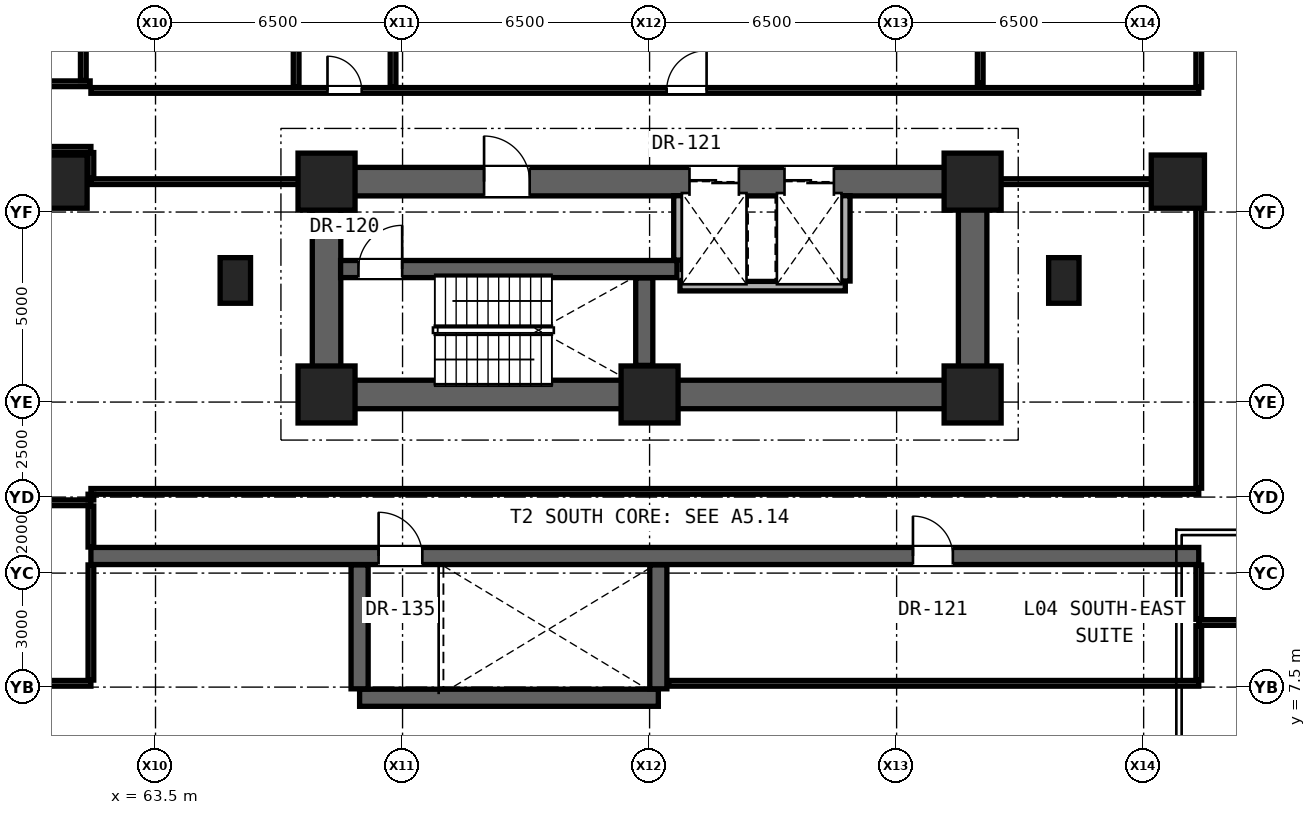
"""IFC4 building model, lengths in metres.
Left out: names, types, materials, properties, quantities, classifications, styles, units other than length and angle.
Written with IfcOpenShell. Run it as: python <this file> out.ifc"""

import sys

from ifc_helpers import new_model, si_unit, direction, frame, frame_2d, origin, origin_2d, place, context, subcontext, project, spatial, rectangle, hollow_rectangle, extrude, element, fill, save


model = new_model("IFC4")
c1 = context("Model", 3, precision=1e-05, world=origin(), true_north=direction((0.0, 1.0)))
c2 = subcontext(c1, "Body", "Model", "MODEL_VIEW")
j1 = project(units=[si_unit("LENGTHUNIT", "METRE"), si_unit("PLANEANGLEUNIT", "RADIAN")], contexts=[c1])
p1 = place(None, origin())
s1 = spatial("IfcSite", under=j1, at=p1, CompositionType="ELEMENT")
p2 = place(p1, origin())
s2 = spatial("IfcBuilding", under=s1, at=p2, CompositionType="ELEMENT")
p3 = place(p2, frame((0.0, 0.0, 18.1)))
s3 = spatial("IfcBuildingStorey", under=s2, at=p3, CompositionType="ELEMENT", Elevation=18.1)
for number, where, z_axis, x_axis in (
    (1, (68.0, 15.2, 0.0), (0.0, 0.0, 1.0), (1.0, 0.0, 0.0)),
    (2, (76.5, 15.2, 0.0), (0.0, 0.0, 1.0), (1.0, 0.0, 0.0)),
    (3, (85.0, 15.2, 0.0), (0.0, 0.0, 1.0), (1.0, 0.0, 0.0)),
    (4, (68.0, 20.8, 0.0), (0.0, 0.0, 1.0), (1.0, 0.0, 0.0)),
    (5, (85.0, 20.8, 0.0), (0.0, 0.0, 1.0), (1.0, 0.0, 0.0)),
):
    element("IfcColumn", number, at=place(p3, frame(where, z_axis=z_axis, x_axis=x_axis)), inside=s3, PredefinedType="COLUMN", context=c2, shape_type="SweptSolid", body=[
        extrude(rectangle(XDim=1.5, YDim=1.5, at=origin_2d()), origin(), (0.0, 0.0, 1.0), 4.3),
    ])
for number, where, z_axis, x_axis in (
    (6, (61.0, 20.8, 0.0), (0.0, 0.0, 1.0), (1.0, 0.0, 0.0)),
    (7, (90.4, 20.8, 0.0), (0.0, 0.0, 1.0), (1.0, 0.0, 0.0)),
):
    element("IfcColumn", number, at=place(p3, frame(where, z_axis=z_axis, x_axis=x_axis)), inside=s3, PredefinedType="COLUMN", context=c2, shape_type="SweptSolid", body=[
        extrude(hollow_rectangle(XDim=1.4, YDim=1.4, WallThickness=0.08, at=origin_2d()), origin(), (0.0, 0.0, 1.0), 4.3),
    ])
for number, where, z_axis, x_axis in (
    (8, (65.6, 18.2, 0.0), (0.0, 0.0, 1.0), (1.0, 0.0, 0.0)),
    (9, (87.4, 18.2, 0.0), (0.0, 0.0, 1.0), (1.0, 0.0, 0.0)),
):
    element("IfcColumn", number, at=place(p3, frame(where, z_axis=z_axis, x_axis=x_axis)), inside=s3, PredefinedType="PILASTER", context=c2, shape_type="SweptSolid", body=[
        extrude(rectangle(XDim=0.8, YDim=1.2, at=origin_2d()), origin(), (0.0, 0.0, 1.0), 4.3),
    ])
p4 = place(p3, frame((68.0, 15.2, 0.0), z_axis=(0.0, 0.0, 1.0), x_axis=(1.0, 0.0, 0.0)))
e10 = element("IfcWall", 10, at=p4, inside=s3, PredefinedType="SHEAR", context=c2, shape_type="SweptSolid", body=[
    extrude(rectangle(XDim=17.0, YDim=0.75, at=frame_2d((8.5, 0.0))), origin(), (0.0, 0.0, 1.0), 3.65),
])
for number, where, z_axis, x_axis in (
    (11, (68.0, 15.2, 0.0), (0.0, 0.0, 1.0), (0.0, 1.0, 0.0)),
    (12, (85.0, 15.2, 0.0), (0.0, 0.0, 1.0), (0.0, 1.0, 0.0)),
):
    element("IfcWall", number, at=place(p3, frame(where, z_axis=z_axis, x_axis=x_axis)), inside=s3, PredefinedType="SHEAR", context=c2, shape_type="SweptSolid", body=[
        extrude(rectangle(XDim=5.6, YDim=0.75, at=frame_2d((2.8, 0.0))), origin(), (0.0, 0.0, 1.0), 3.65),
    ])
p5 = place(p3, frame((68.0, 20.8, 0.0), z_axis=(0.0, 0.0, 1.0), x_axis=(1.0, 0.0, 0.0)))
e13 = element("IfcWall", 13, at=p5, inside=s3, PredefinedType="SHEAR", context=c2, shape_type="SweptSolid", body=[
    extrude(rectangle(XDim=17.0, YDim=0.75, at=frame_2d((8.5, 0.0))), origin(), (0.0, 0.0, 1.0), 3.65),
])
p6 = place(p5, frame((4.145, 0.0, 0.0)))
e14 = element("IfcOpeningElement", 14, at=p6, cuts=e13, PredefinedType="OPENING", context=c2, shape_type="SweptSolid", body=[
    extrude(rectangle(XDim=1.2, YDim=2.25, at=frame_2d((0.6, 1.125))), frame((0.0, 0.385, 0.0), z_axis=(0.0, -1.0, 0.0), x_axis=(1.0, 0.0, 0.0)), (0.0, 0.0, 1.0), 0.77),
])
p7 = place(p5, frame((9.55, 0.0, 0.0)))
e15 = element("IfcOpeningElement", 15, at=p7, cuts=e13, PredefinedType="OPENING", context=c2, shape_type="SweptSolid", body=[
    extrude(rectangle(XDim=1.3, YDim=2.3, at=frame_2d((0.65, 1.15))), frame((0.0, 0.385, 0.0), z_axis=(0.0, -1.0, 0.0), x_axis=(1.0, 0.0, 0.0)), (0.0, 0.0, 1.0), 0.77),
])
p8 = place(p5, frame((12.05, 0.0, 0.0)))
e16 = element("IfcOpeningElement", 16, at=p8, cuts=e13, PredefinedType="OPENING", context=c2, shape_type="SweptSolid", body=[
    extrude(rectangle(XDim=1.3, YDim=2.3, at=frame_2d((0.65, 1.15))), frame((0.0, 0.385, 0.0), z_axis=(0.0, -1.0, 0.0), x_axis=(1.0, 0.0, 0.0)), (0.0, 0.0, 1.0), 0.77),
])
p9 = place(p3, frame((68.87, 7.22, 0.0), z_axis=(0.0, 0.0, 1.0), x_axis=(1.0, 0.0, 0.0)))
e17 = element("IfcWall", 17, at=p9, inside=s3, PredefinedType="SHEAR", context=c2, shape_type="SweptSolid", body=[
    extrude(rectangle(XDim=7.86, YDim=0.45, at=frame_2d((3.93, 0.0))), origin(), (0.0, 0.0, 1.0), 3.65),
])
p10 = place(p3, frame((29.4, 7.6, 0.0), z_axis=(0.0, 0.0, 1.0), x_axis=(1.0, 0.0, 0.0)))
e18 = element("IfcWall", 18, at=p10, inside=s3, PredefinedType="PARTITIONING", context=c2, shape_type="SweptSolid", body=[
    extrude(rectangle(XDim=32.4, YDim=0.15, at=frame_2d((16.2, 0.0))), origin(), (0.0, 0.0, 1.0), 2.869),
])
p11 = place(p3, frame((77.0, 7.6, 0.0), z_axis=(0.0, 0.0, 1.0), x_axis=(1.0, 0.0, 0.0)))
e19 = element("IfcWall", 19, at=p11, inside=s3, PredefinedType="PARTITIONING", context=c2, shape_type="SweptSolid", body=[
    extrude(rectangle(XDim=13.95, YDim=0.15, at=frame_2d((6.975, 0.0))), origin(), (0.0, 0.0, 1.0), 2.786),
])
p12 = place(p3, frame((90.95, 9.2, 0.0), z_axis=(0.0, 0.0, 1.0), x_axis=(1.0, 0.0, 0.0)))
e20 = element("IfcWall", 20, at=p12, inside=s3, PredefinedType="PARTITIONING", context=c2, shape_type="SweptSolid", body=[
    extrude(rectangle(XDim=1.7, YDim=0.15, at=frame_2d((0.85, 0.0))), origin(), (0.0, 0.0, 1.0), 3.65),
])
p13 = place(p3, frame((61.8, 10.95, 0.0), z_axis=(0.0, 0.0, 1.0), x_axis=(1.0, 0.0, 0.0)))
e21 = element("IfcWall", 21, at=p13, inside=s3, PredefinedType="SHEAR", context=c2, shape_type="SweptSolid", body=[
    extrude(rectangle(XDim=29.15, YDim=0.45, at=frame_2d((14.575, 0.0))), origin(), (0.0, 0.0, 1.0), 3.65),
])
p14 = place(p13, frame((7.57, 0.0, 0.0)))
e22 = element("IfcOpeningElement", 22, at=p14, cuts=e21, PredefinedType="OPENING", context=c2, shape_type="SweptSolid", body=[
    extrude(rectangle(XDim=1.15, YDim=2.2, at=frame_2d((0.575, 1.1))), frame((0.0, 0.235, 0.0), z_axis=(0.0, -1.0, 0.0), x_axis=(1.0, 0.0, 0.0)), (0.0, 0.0, 1.0), 0.47),
])
p15 = place(p13, frame((21.63, 0.0, 0.0)))
e23 = element("IfcOpeningElement", 23, at=p15, cuts=e21, PredefinedType="OPENING", context=c2, shape_type="SweptSolid", body=[
    extrude(rectangle(XDim=1.05, YDim=2.2, at=frame_2d((0.525, 1.1))), frame((0.0, 0.235, 0.0), z_axis=(0.0, -1.0, 0.0), x_axis=(1.0, 0.0, 0.0)), (0.0, 0.0, 1.0), 0.47),
])
p16 = place(p3, frame((38.2, 12.35, 0.0), z_axis=(0.0, 0.0, 1.0), x_axis=(1.0, 0.0, 0.0)))
e24 = element("IfcWall", 24, at=p16, inside=s3, PredefinedType="PARTITIONING", context=c2, shape_type="SweptSolid", body=[
    extrude(rectangle(XDim=23.6, YDim=0.15, at=frame_2d((11.8, 0.0))), origin(), (0.0, 0.0, 1.0), 2.602),
])
p17 = place(p3, frame((61.8, 12.65, 0.0), z_axis=(0.0, 0.0, 1.0), x_axis=(1.0, 0.0, 0.0)))
e25 = element("IfcWall", 25, at=p17, inside=s3, PredefinedType="PARTITIONING", context=c2, shape_type="SweptSolid", body=[
    extrude(rectangle(XDim=29.15, YDim=0.15, at=frame_2d((14.575, 0.0))), origin(), (0.0, 0.0, 1.0), 2.786),
])
p18 = place(p3, frame((77.3, 18.05, 0.0), z_axis=(0.0, 0.0, 1.0), x_axis=(1.0, 0.0, 0.0)))
e26 = element("IfcWall", 26, at=p18, inside=s3, PredefinedType="SOLIDWALL", context=c2, shape_type="SweptSolid", body=[
    extrude(rectangle(XDim=4.35, YDim=0.25, at=frame_2d((2.175, 0.0))), origin(), (0.0, 0.0, 1.0), 3.65),
])
p19 = place(p3, frame((68.37, 18.5, 0.0), z_axis=(0.0, 0.0, 1.0), x_axis=(1.0, 0.0, 0.0)))
e27 = element("IfcWall", 27, at=p19, inside=s3, PredefinedType="SHEAR", context=c2, shape_type="SweptSolid", body=[
    extrude(rectangle(XDim=8.85, YDim=0.45, at=frame_2d((4.425, 0.0))), origin(), (0.0, 0.0, 1.0), 3.65),
])
p20 = place(p19, frame((0.47, 0.0, 0.0)))
e28 = element("IfcOpeningElement", 28, at=p20, cuts=e27, PredefinedType="OPENING", context=c2, shape_type="SweptSolid", body=[
    extrude(rectangle(XDim=1.15, YDim=2.2, at=frame_2d((0.575, 1.1))), frame((0.0, 0.235, 0.0), z_axis=(0.0, -1.0, 0.0), x_axis=(1.0, 0.0, 0.0)), (0.0, 0.0, 1.0), 0.47),
])
p21 = place(p3, frame((61.8, 20.8, 0.0), z_axis=(0.0, 0.0, 1.0), x_axis=(1.0, 0.0, 0.0)))
e29 = element("IfcWall", 29, at=p21, inside=s3, PredefinedType="PARTITIONING", context=c2, shape_type="SweptSolid", body=[
    extrude(rectangle(XDim=5.83, YDim=0.15, at=frame_2d((2.915, 0.0))), origin(), (0.0, 0.0, 1.0), 2.542),
])
p22 = place(p3, frame((85.37, 20.8, 0.0), z_axis=(0.0, 0.0, 1.0), x_axis=(1.0, 0.0, 0.0)))
e30 = element("IfcWall", 30, at=p22, inside=s3, PredefinedType="PARTITIONING", context=c2, shape_type="SweptSolid", body=[
    extrude(rectangle(XDim=5.58, YDim=0.15, at=frame_2d((2.79, 0.0))), origin(), (0.0, 0.0, 1.0), 2.542),
])
p23 = place(p3, frame((40.4, 21.65, 0.0), z_axis=(0.0, 0.0, 1.0), x_axis=(1.0, 0.0, 0.0)))
e31 = element("IfcWall", 31, at=p23, inside=s3, PredefinedType="PARTITIONING", context=c2, shape_type="SweptSolid", body=[
    extrude(rectangle(XDim=21.4, YDim=0.15, at=frame_2d((10.7, 0.0))), origin(), (0.0, 0.0, 1.0), 2.602),
])
p24 = place(p3, frame((61.8, 23.2, 0.0), z_axis=(0.0, 0.0, 1.0), x_axis=(1.0, 0.0, 0.0)))
e32 = element("IfcWall", 32, at=p24, inside=s3, PredefinedType="PARTITIONING", context=c2, shape_type="SweptSolid", body=[
    extrude(rectangle(XDim=29.15, YDim=0.15, at=frame_2d((14.575, 0.0))), origin(), (0.0, 0.0, 1.0), 2.715),
])
p25 = place(p24, frame((6.225, 0.0, 0.0)))
e33 = element("IfcOpeningElement", 33, at=p25, cuts=e32, PredefinedType="OPENING", context=c2, shape_type="SweptSolid", body=[
    extrude(rectangle(XDim=0.9, YDim=2.1, at=frame_2d((0.45, 1.05))), frame((0.0, 0.085, 0.0), z_axis=(0.0, -1.0, 0.0), x_axis=(1.0, 0.0, 0.0)), (0.0, 0.0, 1.0), 0.17),
])
p26 = place(p24, frame((15.15, 0.0, 0.0)))
e34 = element("IfcOpeningElement", 34, at=p26, cuts=e32, PredefinedType="OPENING", context=c2, shape_type="SweptSolid", body=[
    extrude(rectangle(XDim=1.05, YDim=2.2, at=frame_2d((0.525, 1.1))), frame((0.0, 0.085, 0.0), z_axis=(0.0, -1.0, 0.0), x_axis=(1.0, 0.0, 0.0)), (0.0, 0.0, 1.0), 0.17),
])
p27 = place(p3, frame((42.65, 23.375, 0.0), z_axis=(0.0, 0.0, 1.0), x_axis=(1.0, 0.0, 0.0)))
e35 = element("IfcWall", 35, at=p27, inside=s3, PredefinedType="PARTITIONING", context=c2, shape_type="SweptSolid", body=[
    extrude(rectangle(XDim=19.13, YDim=0.15, at=frame_2d((9.565, 0.0))), origin(), (0.0, 0.0, 1.0), 2.602),
])
p28 = place(p3, frame((61.6, 23.46, 0.0), z_axis=(0.0, 0.0, 1.0), x_axis=(0.0, 1.0, 0.0)))
e36 = element("IfcWall", 36, at=p28, inside=s3, PredefinedType="PARTITIONING", context=c2, shape_type="SweptSolid", body=[
    extrude(rectangle(XDim=7.855, YDim=0.15, at=frame_2d((3.927, 0.0))), origin(), (0.0, 0.0, 1.0), 2.869),
])
p29 = place(p3, frame((61.8, 7.685, 0.0), z_axis=(0.0, 0.0, 1.0), x_axis=(0.0, 1.0, 0.0)))
e37 = element("IfcWall", 37, at=p29, inside=s3, PredefinedType="PARTITIONING", context=c2, shape_type="SweptSolid", body=[
    extrude(rectangle(XDim=3.03, YDim=0.15, at=frame_2d((1.515, 0.0))), origin(), (0.0, 0.0, 1.0), 3.65),
])
p30 = place(p3, frame((61.8, 11.185, 0.0), z_axis=(0.0, 0.0, 1.0), x_axis=(0.0, 1.0, 0.0)))
e38 = element("IfcWall", 38, at=p30, inside=s3, PredefinedType="PARTITIONING", context=c2, shape_type="SweptSolid", body=[
    extrude(rectangle(XDim=1.08, YDim=0.15, at=frame_2d((0.54, 0.0))), origin(), (0.0, 0.0, 1.0), 3.65),
])
p31 = place(p3, frame((61.8, 12.425, 0.0), z_axis=(0.0, 0.0, 1.0), x_axis=(0.0, 1.0, 0.0)))
e39 = element("IfcWall", 39, at=p31, inside=s3, PredefinedType="PARTITIONING", context=c2, shape_type="SweptSolid", body=[
    extrude(rectangle(XDim=0.15, YDim=0.15, at=frame_2d((0.075, 0.0))), origin(), (0.0, 0.0, 1.0), 3.65),
])
p32 = place(p3, frame((61.8, 20.885, 0.0), z_axis=(0.0, 0.0, 1.0), x_axis=(0.0, 1.0, 0.0)))
e40 = element("IfcWall", 40, at=p32, inside=s3, PredefinedType="PARTITIONING", context=c2, shape_type="SweptSolid", body=[
    extrude(rectangle(XDim=0.68, YDim=0.15, at=frame_2d((0.34, 0.0))), origin(), (0.0, 0.0, 1.0), 2.542),
])
p33 = place(p3, frame((67.2, 23.285, 0.0), z_axis=(0.0, 0.0, 1.0), x_axis=(0.0, 1.0, 0.0)))
e41 = element("IfcWall", 41, at=p33, inside=s3, PredefinedType="PARTITIONING", context=c2, shape_type="SweptSolid", body=[
    extrude(rectangle(XDim=2.43, YDim=0.15, at=frame_2d((1.215, 0.0))), origin(), (0.0, 0.0, 1.0), 3.65),
])
p34 = place(p3, frame((68.87, 7.455, 0.0), z_axis=(0.0, 0.0, 1.0), x_axis=(0.0, 1.0, 0.0)))
e42 = element("IfcWall", 42, at=p34, inside=s3, PredefinedType="SHEAR", context=c2, shape_type="SweptSolid", body=[
    extrude(rectangle(XDim=3.26, YDim=0.45, at=frame_2d((1.63, 0.0))), origin(), (0.0, 0.0, 1.0), 3.65),
])
p35 = place(p3, frame((69.75, 23.285, 0.0), z_axis=(0.0, 0.0, 1.0), x_axis=(0.0, 1.0, 0.0)))
e43 = element("IfcWall", 43, at=p35, inside=s3, PredefinedType="PARTITIONING", context=c2, shape_type="SweptSolid", body=[
    extrude(rectangle(XDim=2.43, YDim=0.15, at=frame_2d((1.215, 0.0))), origin(), (0.0, 0.0, 1.0), 3.65),
])
p36 = place(p3, frame((76.36, 15.965, 0.0), z_axis=(0.0, 0.0, 1.0), x_axis=(0.0, 1.0, 0.0)))
e44 = element("IfcWall", 44, at=p36, inside=s3, PredefinedType="SHEAR", context=c2, shape_type="SweptSolid", body=[
    extrude(rectangle(XDim=2.3, YDim=0.45, at=frame_2d((1.15, 0.0))), origin(), (0.0, 0.0, 1.0), 3.65),
])
p37 = place(p3, frame((76.73, 7.455, 0.0), z_axis=(0.0, 0.0, 1.0), x_axis=(0.0, 1.0, 0.0)))
e45 = element("IfcWall", 45, at=p37, inside=s3, PredefinedType="SHEAR", context=c2, shape_type="SweptSolid", body=[
    extrude(rectangle(XDim=3.26, YDim=0.45, at=frame_2d((1.63, 0.0))), origin(), (0.0, 0.0, 1.0), 3.65),
])
p38 = place(p3, frame((77.26, 18.735, 0.0), z_axis=(0.0, 0.0, 1.0), x_axis=(0.0, 1.0, 0.0)))
e46 = element("IfcWall", 46, at=p38, inside=s3, PredefinedType="SOLIDWALL", context=c2, shape_type="SweptSolid", body=[
    extrude(rectangle(XDim=1.695, YDim=0.25, at=frame_2d((0.847, 0.0))), origin(), (0.0, 0.0, 1.0), 3.65),
])
p39 = place(p3, frame((81.65, 18.185, 0.0), z_axis=(0.0, 0.0, 1.0), x_axis=(0.0, 1.0, 0.0)))
e47 = element("IfcWall", 47, at=p39, inside=s3, PredefinedType="SOLIDWALL", context=c2, shape_type="SweptSolid", body=[
    extrude(rectangle(XDim=2.245, YDim=0.25, at=frame_2d((1.123, 0.0))), origin(), (0.0, 0.0, 1.0), 3.65),
])
p40 = place(p3, frame((85.2, 23.4, 0.0), z_axis=(0.0, 0.0, 1.0), x_axis=(0.0, 1.0, 0.0)))
e48 = element("IfcWall", 48, at=p40, inside=s3, PredefinedType="PARTITIONING", context=c2, shape_type="SweptSolid", body=[
    extrude(rectangle(XDim=3.047, YDim=0.15, at=frame_2d((1.523, 0.0))), origin(), (0.0, 0.0, 1.0), 2.715),
])
p41 = place(p3, frame((90.95, 7.685, 0.0), z_axis=(0.0, 0.0, 1.0), x_axis=(0.0, 1.0, 0.0)))
e49 = element("IfcWall", 49, at=p41, inside=s3, PredefinedType="PARTITIONING", context=c2, shape_type="SweptSolid", body=[
    extrude(rectangle(XDim=1.43, YDim=0.15, at=frame_2d((0.715, 0.0))), origin(), (0.0, 0.0, 1.0), 3.65),
])
p42 = place(p3, frame((90.95, 9.285, 0.0), z_axis=(0.0, 0.0, 1.0), x_axis=(0.0, 1.0, 0.0)))
e50 = element("IfcWall", 50, at=p42, inside=s3, PredefinedType="PARTITIONING", context=c2, shape_type="SweptSolid", body=[
    extrude(rectangle(XDim=1.43, YDim=0.15, at=frame_2d((0.715, 0.0))), origin(), (0.0, 0.0, 1.0), 3.65),
])
p43 = place(p3, frame((90.95, 12.735, 0.0), z_axis=(0.0, 0.0, 1.0), x_axis=(0.0, 1.0, 0.0)))
e51 = element("IfcWall", 51, at=p43, inside=s3, PredefinedType="PARTITIONING", context=c2, shape_type="SweptSolid", body=[
    extrude(rectangle(XDim=7.98, YDim=0.15, at=frame_2d((3.99, 0.0))), origin(), (0.0, 0.0, 1.0), 2.786),
])
p44 = place(p3, frame((90.95, 23.285, 0.0), z_axis=(0.0, 0.0, 1.0), x_axis=(0.0, 1.0, 0.0)))
e52 = element("IfcWall", 52, at=p44, inside=s3, PredefinedType="PARTITIONING", context=c2, shape_type="SweptSolid", body=[
    extrude(rectangle(XDim=6.03, YDim=0.15, at=frame_2d((3.015, 0.0))), origin(), (0.0, 0.0, 1.0), 2.869),
])
p45 = place(p6, origin())
e53 = element("IfcDoor", 53, at=p45, inside=s3, OperationType="SINGLE_SWING_LEFT", PredefinedType="DOOR", context=c2, shape_type="SweptSolid", body=[
    extrude(rectangle(XDim=1.2, YDim=2.25, at=frame_2d((0.6, 1.125))), frame((0.0, 0.025, 0.0), z_axis=(0.0, -1.0, 0.0), x_axis=(1.0, 0.0, 0.0)), (0.0, 0.0, 1.0), 0.05),
])
fill(e14, e53)
p46 = place(p20, origin())
e54 = element("IfcDoor", 54, at=p46, inside=s3, OperationType="SINGLE_SWING_RIGHT", PredefinedType="DOOR", context=c2, shape_type="SweptSolid", body=[
    extrude(rectangle(XDim=1.15, YDim=2.2, at=frame_2d((0.575, 1.1))), frame((0.0, 0.025, 0.0), z_axis=(0.0, -1.0, 0.0), x_axis=(1.0, 0.0, 0.0)), (0.0, 0.0, 1.0), 0.05),
])
fill(e28, e54)
p47 = place(p25, origin())
e55 = element("IfcDoor", 55, at=p47, inside=s3, OperationType="SINGLE_SWING_LEFT", PredefinedType="DOOR", context=c2, shape_type="SweptSolid", body=[
    extrude(rectangle(XDim=0.9, YDim=2.1, at=frame_2d((0.45, 1.05))), frame((0.0, 0.025, 0.0), z_axis=(0.0, -1.0, 0.0), x_axis=(1.0, 0.0, 0.0)), (0.0, 0.0, 1.0), 0.05),
])
fill(e33, e55)
p48 = place(p14, origin())
e56 = element("IfcDoor", 56, at=p48, inside=s3, OperationType="SINGLE_SWING_LEFT", PredefinedType="DOOR", context=c2, shape_type="SweptSolid", body=[
    extrude(rectangle(XDim=1.15, YDim=2.2, at=frame_2d((0.575, 1.1))), frame((0.0, 0.025, 0.0), z_axis=(0.0, -1.0, 0.0), x_axis=(1.0, 0.0, 0.0)), (0.0, 0.0, 1.0), 0.05),
])
fill(e22, e56)
p49 = place(p26, origin())
e57 = element("IfcDoor", 57, at=p49, inside=s3, OperationType="SINGLE_SWING_RIGHT", PredefinedType="DOOR", context=c2, shape_type="SweptSolid", body=[
    extrude(rectangle(XDim=1.05, YDim=2.2, at=frame_2d((0.525, 1.1))), frame((0.0, 0.025, 0.0), z_axis=(0.0, -1.0, 0.0), x_axis=(1.0, 0.0, 0.0)), (0.0, 0.0, 1.0), 0.05),
])
fill(e34, e57)
p50 = place(p15, origin())
e58 = element("IfcDoor", 58, at=p50, inside=s3, OperationType="SINGLE_SWING_LEFT", PredefinedType="DOOR", context=c2, shape_type="SweptSolid", body=[
    extrude(rectangle(XDim=1.05, YDim=2.2, at=frame_2d((0.525, 1.1))), frame((0.0, 0.025, 0.0), z_axis=(0.0, -1.0, 0.0), x_axis=(1.0, 0.0, 0.0)), (0.0, 0.0, 1.0), 0.05),
])
fill(e23, e58)
p51 = place(p7, origin())
e59 = element("IfcDoor", 59, at=p51, inside=s3, OperationType="DOUBLE_DOOR_SLIDING", PredefinedType="DOOR", context=c2, shape_type="SweptSolid", body=[
    extrude(rectangle(XDim=1.3, YDim=2.3, at=frame_2d((0.65, 1.15))), frame((0.0, 0.025, 0.0), z_axis=(0.0, -1.0, 0.0), x_axis=(1.0, 0.0, 0.0)), (0.0, 0.0, 1.0), 0.05),
])
fill(e15, e59)
p52 = place(p8, origin())
e60 = element("IfcDoor", 60, at=p52, inside=s3, OperationType="DOUBLE_DOOR_SLIDING", PredefinedType="DOOR", context=c2, shape_type="SweptSolid", body=[
    extrude(rectangle(XDim=1.3, YDim=2.3, at=frame_2d((0.65, 1.15))), frame((0.0, 0.025, 0.0), z_axis=(0.0, -1.0, 0.0), x_axis=(1.0, 0.0, 0.0)), (0.0, 0.0, 1.0), 0.05),
])
fill(e16, e60)
save(model, sys.argv[1])
